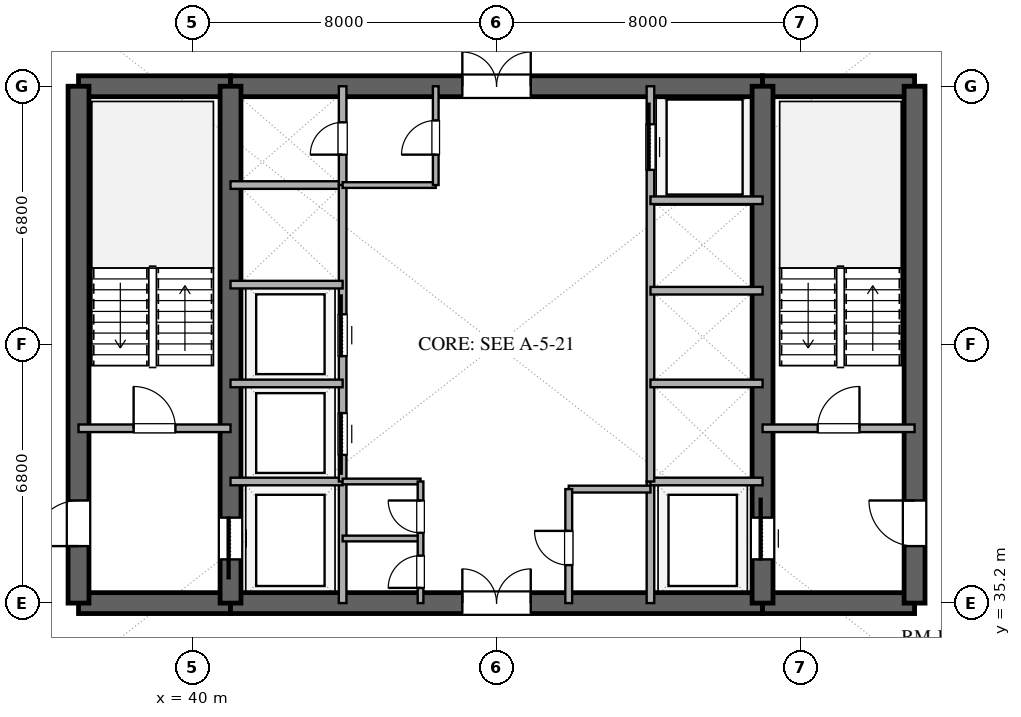
"""IFC4 building model, lengths in metres.
Left out: names, types, materials, properties, quantities, classifications, styles, units other than length and angle.
Written with IfcOpenShell. Run it as: python <this file> out.ifc"""

import sys

from ifc_helpers import new_model, si_unit, direction, frame, frame_2d, origin, place, context, subcontext, project, spatial, rectangle, extrude, element, fill, save


model = new_model("IFC4")
c1 = context("Model", 3, precision=1e-05, world=origin(), true_north=direction((0.0, 1.0)))
c2 = subcontext(c1, "Body", "Model", "MODEL_VIEW")
j1 = project(units=[si_unit("LENGTHUNIT", "METRE"), si_unit("PLANEANGLEUNIT", "RADIAN")], contexts=[c1])
p1 = place(None, origin())
s1 = spatial("IfcSite", under=j1, at=p1, CompositionType="ELEMENT")
p2 = place(p1, origin())
s2 = spatial("IfcBuilding", under=s1, at=p2, CompositionType="ELEMENT")
p3 = place(p2, frame((0.0, 0.0, 127.2)))
s3 = spatial("IfcBuildingStorey", under=s2, at=p3, CompositionType="ELEMENT", Elevation=127.2)
p4 = place(p3, frame((37.0, 35.2, 0.0), z_axis=(0.0, 0.0, 1.0), x_axis=(1.0, 0.0, 0.0)))
e1 = element("IfcWall", 1, at=p4, inside=s3, PredefinedType="SHEAR", context=c2, shape_type="SweptSolid", body=[
    extrude(rectangle(XDim=4.0, YDim=0.55, at=frame_2d((2.0, 0.0))), origin(), (0.0, 0.0, 1.0), 3.38),
])
p5 = place(p3, frame((41.0, 35.2, 0.0), z_axis=(0.0, 0.0, 1.0), x_axis=(1.0, 0.0, 0.0)))
e2 = element("IfcWall", 2, at=p5, inside=s3, PredefinedType="SHEAR", context=c2, shape_type="SweptSolid", body=[
    extrude(rectangle(XDim=14.0, YDim=0.55, at=frame_2d((7.0, 0.0))), origin(), (0.0, 0.0, 1.0), 3.38),
])
p6 = place(p5, frame((6.1, 0.0, 0.0)))
e3 = element("IfcOpeningElement", 3, at=p6, cuts=e2, PredefinedType="OPENING", context=c2, shape_type="SweptSolid", body=[
    extrude(rectangle(XDim=1.8, YDim=2.25, at=frame_2d((0.9, 1.125))), frame((0.0, 0.285, 0.0), z_axis=(0.0, -1.0, 0.0), x_axis=(1.0, 0.0, 0.0)), (0.0, 0.0, 1.0), 0.57),
])
for number, where, z_axis, x_axis in (
    (4, (55.0, 35.2, 0.0), (0.0, 0.0, 1.0), (1.0, 0.0, 0.0)),
    (5, (37.0, 48.8, 0.0), (0.0, 0.0, 1.0), (1.0, 0.0, 0.0)),
):
    element("IfcWall", number, at=place(p3, frame(where, z_axis=z_axis, x_axis=x_axis)), inside=s3, PredefinedType="SHEAR", context=c2, shape_type="SweptSolid", body=[
        extrude(rectangle(XDim=4.0, YDim=0.55, at=frame_2d((2.0, 0.0))), origin(), (0.0, 0.0, 1.0), 3.38),
    ])
p7 = place(p3, frame((41.0, 48.8, 0.0), z_axis=(0.0, 0.0, 1.0), x_axis=(1.0, 0.0, 0.0)))
e6 = element("IfcWall", 6, at=p7, inside=s3, PredefinedType="SHEAR", context=c2, shape_type="SweptSolid", body=[
    extrude(rectangle(XDim=14.0, YDim=0.55, at=frame_2d((7.0, 0.0))), origin(), (0.0, 0.0, 1.0), 3.38),
])
p8 = place(p7, frame((6.1, 0.0, 0.0)))
e7 = element("IfcOpeningElement", 7, at=p8, cuts=e6, PredefinedType="OPENING", context=c2, shape_type="SweptSolid", body=[
    extrude(rectangle(XDim=1.8, YDim=2.25, at=frame_2d((0.9, 1.125))), frame((0.0, 0.285, 0.0), z_axis=(0.0, -1.0, 0.0), x_axis=(1.0, 0.0, 0.0)), (0.0, 0.0, 1.0), 0.57),
])
p9 = place(p3, frame((55.0, 48.8, 0.0), z_axis=(0.0, 0.0, 1.0), x_axis=(1.0, 0.0, 0.0)))
e8 = element("IfcWall", 8, at=p9, inside=s3, PredefinedType="SHEAR", context=c2, shape_type="SweptSolid", body=[
    extrude(rectangle(XDim=4.0, YDim=0.55, at=frame_2d((2.0, 0.0))), origin(), (0.0, 0.0, 1.0), 3.38),
])
p10 = place(p3, frame((37.0, 35.2, 0.0), z_axis=(0.0, 0.0, 1.0), x_axis=(0.0, 1.0, 0.0)))
e9 = element("IfcWall", 9, at=p10, inside=s3, PredefinedType="SHEAR", context=c2, shape_type="SweptSolid", body=[
    extrude(rectangle(XDim=13.6, YDim=0.55, at=frame_2d((6.8, 0.0))), origin(), (0.0, 0.0, 1.0), 3.38),
])
p11 = place(p10, frame((1.5, 0.0, 0.0)))
e10 = element("IfcOpeningElement", 10, at=p11, cuts=e9, PredefinedType="OPENING", context=c2, shape_type="SweptSolid", body=[
    extrude(rectangle(XDim=1.2, YDim=2.15, at=frame_2d((0.6, 1.075))), frame((0.0, 0.285, 0.0), z_axis=(0.0, -1.0, 0.0), x_axis=(1.0, 0.0, 0.0)), (0.0, 0.0, 1.0), 0.57),
])
p12 = place(p3, frame((59.0, 35.2, 0.0), z_axis=(0.0, 0.0, 1.0), x_axis=(0.0, 1.0, 0.0)))
e11 = element("IfcWall", 11, at=p12, inside=s3, PredefinedType="SHEAR", context=c2, shape_type="SweptSolid", body=[
    extrude(rectangle(XDim=13.6, YDim=0.55, at=frame_2d((6.8, 0.0))), origin(), (0.0, 0.0, 1.0), 3.38),
])
p13 = place(p12, frame((1.5, 0.0, 0.0)))
e12 = element("IfcOpeningElement", 12, at=p13, cuts=e11, PredefinedType="OPENING", context=c2, shape_type="SweptSolid", body=[
    extrude(rectangle(XDim=1.2, YDim=2.15, at=frame_2d((0.6, 1.075))), frame((0.0, 0.285, 0.0), z_axis=(0.0, -1.0, 0.0), x_axis=(1.0, 0.0, 0.0)), (0.0, 0.0, 1.0), 0.57),
])
p14 = place(p3, frame((41.0, 35.2, 0.0), z_axis=(0.0, 0.0, 1.0), x_axis=(0.0, 1.0, 0.0)))
e13 = element("IfcWall", 13, at=p14, inside=s3, PredefinedType="SHEAR", context=c2, shape_type="SweptSolid", body=[
    extrude(rectangle(XDim=13.6, YDim=0.55, at=frame_2d((6.8, 0.0))), origin(), (0.0, 0.0, 1.0), 3.38),
])
p15 = place(p14, frame((1.15, 0.0, 0.0)))
e14 = element("IfcOpeningElement", 14, at=p15, cuts=e13, PredefinedType="OPENING", context=c2, shape_type="SweptSolid", body=[
    extrude(rectangle(XDim=1.1, YDim=2.2, at=frame_2d((0.55, 1.1))), frame((0.0, 0.285, 0.0), z_axis=(0.0, -1.0, 0.0), x_axis=(1.0, 0.0, 0.0)), (0.0, 0.0, 1.0), 0.57),
])
p16 = place(p3, frame((55.0, 35.2, 0.0), z_axis=(0.0, 0.0, 1.0), x_axis=(0.0, 1.0, 0.0)))
e15 = element("IfcWall", 15, at=p16, inside=s3, PredefinedType="SHEAR", context=c2, shape_type="SweptSolid", body=[
    extrude(rectangle(XDim=13.6, YDim=0.55, at=frame_2d((6.8, 0.0))), origin(), (0.0, 0.0, 1.0), 3.38),
])
p17 = place(p16, frame((1.15, 0.0, 0.0)))
e16 = element("IfcOpeningElement", 16, at=p17, cuts=e15, PredefinedType="OPENING", context=c2, shape_type="SweptSolid", body=[
    extrude(rectangle(XDim=1.1, YDim=2.2, at=frame_2d((0.55, 1.1))), frame((0.0, 0.285, 0.0), z_axis=(0.0, -1.0, 0.0), x_axis=(1.0, 0.0, 0.0)), (0.0, 0.0, 1.0), 0.57),
])
p18 = place(p3, frame((37.0, 39.8, 0.0), z_axis=(0.0, 0.0, 1.0), x_axis=(1.0, 0.0, 0.0)))
e17 = element("IfcWall", 17, at=p18, inside=s3, PredefinedType="SOLIDWALL", context=c2, shape_type="SweptSolid", body=[
    extrude(rectangle(XDim=4.0, YDim=0.2, at=frame_2d((2.0, 0.0))), origin(), (0.0, 0.0, 1.0), 2.74),
])
p19 = place(p18, frame((1.45, 0.0, 0.0)))
e18 = element("IfcOpeningElement", 18, at=p19, cuts=e17, PredefinedType="OPENING", context=c2, shape_type="SweptSolid", body=[
    extrude(rectangle(XDim=1.1, YDim=2.15, at=frame_2d((0.55, 1.075))), frame((0.0, 0.11, 0.0), z_axis=(0.0, -1.0, 0.0), x_axis=(1.0, 0.0, 0.0)), (0.0, 0.0, 1.0), 0.22),
])
p20 = place(p3, frame((55.0, 39.8, 0.0), z_axis=(0.0, 0.0, 1.0), x_axis=(1.0, 0.0, 0.0)))
e19 = element("IfcWall", 19, at=p20, inside=s3, PredefinedType="SOLIDWALL", context=c2, shape_type="SweptSolid", body=[
    extrude(rectangle(XDim=4.0, YDim=0.2, at=frame_2d((2.0, 0.0))), origin(), (0.0, 0.0, 1.0), 2.74),
])
p21 = place(p20, frame((1.45, 0.0, 0.0)))
e20 = element("IfcOpeningElement", 20, at=p21, cuts=e19, PredefinedType="OPENING", context=c2, shape_type="SweptSolid", body=[
    extrude(rectangle(XDim=1.1, YDim=2.15, at=frame_2d((0.55, 1.075))), frame((0.0, 0.11, 0.0), z_axis=(0.0, -1.0, 0.0), x_axis=(1.0, 0.0, 0.0)), (0.0, 0.0, 1.0), 0.22),
])
p22 = place(p3, frame((43.95, 35.2, 0.0), z_axis=(0.0, 0.0, 1.0), x_axis=(0.0, 1.0, 0.0)))
e21 = element("IfcWall", 21, at=p22, inside=s3, PredefinedType="SOLIDWALL", context=c2, shape_type="SweptSolid", body=[
    extrude(rectangle(XDim=3.2, YDim=0.2, at=frame_2d((1.6, 0.0))), origin(), (0.0, 0.0, 1.0), 2.74),
])
p23 = place(p3, frame((41.0, 38.4, 0.0), z_axis=(0.0, 0.0, 1.0), x_axis=(1.0, 0.0, 0.0)))
e22 = element("IfcWall", 22, at=p23, inside=s3, PredefinedType="SOLIDWALL", context=c2, shape_type="SweptSolid", body=[
    extrude(rectangle(XDim=2.95, YDim=0.2, at=frame_2d((1.475, 0.0))), origin(), (0.0, 0.0, 1.0), 2.74),
])
p24 = place(p3, frame((52.05, 35.2, 0.0), z_axis=(0.0, 0.0, 1.0), x_axis=(0.0, 1.0, 0.0)))
e23 = element("IfcWall", 23, at=p24, inside=s3, PredefinedType="SOLIDWALL", context=c2, shape_type="SweptSolid", body=[
    extrude(rectangle(XDim=3.2, YDim=0.2, at=frame_2d((1.6, 0.0))), origin(), (0.0, 0.0, 1.0), 2.74),
])
for number, where, z_axis, x_axis in (
    (24, (52.05, 38.4, 0.0), (0.0, 0.0, 1.0), (1.0, 0.0, 0.0)),
    (25, (41.0, 46.2, 0.0), (0.0, 0.0, 1.0), (1.0, 0.0, 0.0)),
):
    element("IfcWall", number, at=place(p3, frame(where, z_axis=z_axis, x_axis=x_axis)), inside=s3, PredefinedType="SOLIDWALL", context=c2, shape_type="SweptSolid", body=[
        extrude(rectangle(XDim=2.95, YDim=0.2, at=frame_2d((1.475, 0.0))), origin(), (0.0, 0.0, 1.0), 2.74),
    ])
p25 = place(p3, frame((43.95, 46.2, 0.0), z_axis=(0.0, 0.0, 1.0), x_axis=(0.0, 1.0, 0.0)))
e26 = element("IfcWall", 26, at=p25, inside=s3, PredefinedType="SOLIDWALL", context=c2, shape_type="SweptSolid", body=[
    extrude(rectangle(XDim=2.6, YDim=0.2, at=frame_2d((1.3, 0.0))), origin(), (0.0, 0.0, 1.0), 2.74),
])
p26 = place(p25, frame((0.8, 0.0, 0.0)))
e27 = element("IfcOpeningElement", 27, at=p26, cuts=e26, PredefinedType="OPENING", context=c2, shape_type="SweptSolid", body=[
    extrude(rectangle(XDim=0.85, YDim=2.15, at=frame_2d((0.425, 1.075))), frame((0.0, 0.11, 0.0), z_axis=(0.0, -1.0, 0.0), x_axis=(1.0, 0.0, 0.0)), (0.0, 0.0, 1.0), 0.22),
])
p27 = place(p3, frame((43.95, 38.4, 0.0), z_axis=(0.0, 0.0, 1.0), x_axis=(0.0, 1.0, 0.0)))
e28 = element("IfcWall", 28, at=p27, inside=s3, PredefinedType="SOLIDWALL", context=c2, shape_type="SweptSolid", body=[
    extrude(rectangle(XDim=7.8, YDim=0.2, at=frame_2d((3.9, 0.0))), origin(), (0.0, 0.0, 1.0), 2.74),
])
p28 = place(p27, frame((0.7, 0.0, 0.0)))
e29 = element("IfcOpeningElement", 29, at=p28, cuts=e28, PredefinedType="OPENING", context=c2, shape_type="SweptSolid", body=[
    extrude(rectangle(XDim=1.1, YDim=2.2, at=frame_2d((0.55, 1.1))), frame((0.0, 0.11, 0.0), z_axis=(0.0, -1.0, 0.0), x_axis=(1.0, 0.0, 0.0)), (0.0, 0.0, 1.0), 0.22),
])
p29 = place(p27, frame((3.3, 0.0, 0.0)))
e30 = element("IfcOpeningElement", 30, at=p29, cuts=e28, PredefinedType="OPENING", context=c2, shape_type="SweptSolid", body=[
    extrude(rectangle(XDim=1.1, YDim=2.2, at=frame_2d((0.55, 1.1))), frame((0.0, 0.11, 0.0), z_axis=(0.0, -1.0, 0.0), x_axis=(1.0, 0.0, 0.0)), (0.0, 0.0, 1.0), 0.22),
])
for number, where, z_axis, x_axis in (
    (31, (41.0, 40.98, 0.0), (0.0, 0.0, 1.0), (1.0, 0.0, 0.0)),
    (32, (41.0, 43.58, 0.0), (0.0, 0.0, 1.0), (1.0, 0.0, 0.0)),
):
    element("IfcWall", number, at=place(p3, frame(where, z_axis=z_axis, x_axis=x_axis)), inside=s3, PredefinedType="SOLIDWALL", context=c2, shape_type="SweptSolid", body=[
        extrude(rectangle(XDim=2.95, YDim=0.2, at=frame_2d((1.475, 0.0))), origin(), (0.0, 0.0, 1.0), 2.74),
    ])
p30 = place(p3, frame((52.05, 38.4, 0.0), z_axis=(0.0, 0.0, 1.0), x_axis=(0.0, 1.0, 0.0)))
e33 = element("IfcWall", 33, at=p30, inside=s3, PredefinedType="SOLIDWALL", context=c2, shape_type="SweptSolid", body=[
    extrude(rectangle(XDim=10.4, YDim=0.2, at=frame_2d((5.2, 0.0))), origin(), (0.0, 0.0, 1.0), 2.74),
])
p31 = place(p30, frame((8.2, 0.0, 0.0)))
e34 = element("IfcOpeningElement", 34, at=p31, cuts=e33, PredefinedType="OPENING", context=c2, shape_type="SweptSolid", body=[
    extrude(rectangle(XDim=1.2, YDim=2.2, at=frame_2d((0.6, 1.1))), frame((0.0, 0.11, 0.0), z_axis=(0.0, -1.0, 0.0), x_axis=(1.0, 0.0, 0.0)), (0.0, 0.0, 1.0), 0.22),
])
for number, where, z_axis, x_axis in (
    (35, (52.05, 40.98, 0.0), (0.0, 0.0, 1.0), (1.0, 0.0, 0.0)),
    (36, (52.05, 43.42, 0.0), (0.0, 0.0, 1.0), (1.0, 0.0, 0.0)),
    (37, (52.05, 45.8, 0.0), (0.0, 0.0, 1.0), (1.0, 0.0, 0.0)),
):
    element("IfcWall", number, at=place(p3, frame(where, z_axis=z_axis, x_axis=x_axis)), inside=s3, PredefinedType="SOLIDWALL", context=c2, shape_type="SweptSolid", body=[
        extrude(rectangle(XDim=2.95, YDim=0.2, at=frame_2d((1.475, 0.0))), origin(), (0.0, 0.0, 1.0), 2.74),
    ])
for number, where, z_axis, x_axis in (
    (38, (43.95, 36.9, 0.0), (0.0, 0.0, 1.0), (1.0, 0.0, 0.0)),
    (39, (43.95, 38.4, 0.0), (0.0, 0.0, 1.0), (1.0, 0.0, 0.0)),
):
    element("IfcWall", number, at=place(p3, frame(where, z_axis=z_axis, x_axis=x_axis)), inside=s3, PredefinedType="PARTITIONING", context=c2, shape_type="SweptSolid", body=[
        extrude(rectangle(XDim=2.05, YDim=0.15, at=frame_2d((1.025, 0.0))), origin(), (0.0, 0.0, 1.0), 2.74),
    ])
p32 = place(p3, frame((46.0, 35.2, 0.0), z_axis=(0.0, 0.0, 1.0), x_axis=(0.0, 1.0, 0.0)))
e40 = element("IfcWall", 40, at=p32, inside=s3, PredefinedType="PARTITIONING", context=c2, shape_type="SweptSolid", body=[
    extrude(rectangle(XDim=3.2, YDim=0.15, at=frame_2d((1.6, 0.0))), origin(), (0.0, 0.0, 1.0), 2.74),
])
p33 = place(p32, frame((0.4, 0.0, 0.0)))
e41 = element("IfcOpeningElement", 41, at=p33, cuts=e40, PredefinedType="OPENING", context=c2, shape_type="SweptSolid", body=[
    extrude(rectangle(XDim=0.85, YDim=2.15, at=frame_2d((0.425, 1.075))), frame((0.0, 0.085, 0.0), z_axis=(0.0, -1.0, 0.0), x_axis=(1.0, 0.0, 0.0)), (0.0, 0.0, 1.0), 0.17),
])
p34 = place(p32, frame((1.85, 0.0, 0.0)))
e42 = element("IfcOpeningElement", 42, at=p34, cuts=e40, PredefinedType="OPENING", context=c2, shape_type="SweptSolid", body=[
    extrude(rectangle(XDim=0.85, YDim=2.15, at=frame_2d((0.425, 1.075))), frame((0.0, 0.085, 0.0), z_axis=(0.0, -1.0, 0.0), x_axis=(1.0, 0.0, 0.0)), (0.0, 0.0, 1.0), 0.17),
])
p35 = place(p3, frame((43.95, 46.2, 0.0), z_axis=(0.0, 0.0, 1.0), x_axis=(1.0, 0.0, 0.0)))
e43 = element("IfcWall", 43, at=p35, inside=s3, PredefinedType="PARTITIONING", context=c2, shape_type="SweptSolid", body=[
    extrude(rectangle(XDim=2.45, YDim=0.15, at=frame_2d((1.225, 0.0))), origin(), (0.0, 0.0, 1.0), 2.74),
])
p36 = place(p3, frame((46.4, 46.2, 0.0), z_axis=(0.0, 0.0, 1.0), x_axis=(0.0, 1.0, 0.0)))
e44 = element("IfcWall", 44, at=p36, inside=s3, PredefinedType="PARTITIONING", context=c2, shape_type="SweptSolid", body=[
    extrude(rectangle(XDim=2.6, YDim=0.15, at=frame_2d((1.3, 0.0))), origin(), (0.0, 0.0, 1.0), 2.74),
])
p37 = place(p36, frame((0.8, 0.0, 0.0)))
e45 = element("IfcOpeningElement", 45, at=p37, cuts=e44, PredefinedType="OPENING", context=c2, shape_type="SweptSolid", body=[
    extrude(rectangle(XDim=0.9, YDim=2.15, at=frame_2d((0.45, 1.075))), frame((0.0, 0.085, 0.0), z_axis=(0.0, -1.0, 0.0), x_axis=(1.0, 0.0, 0.0)), (0.0, 0.0, 1.0), 0.17),
])
p38 = place(p3, frame((49.9, 38.2, 0.0), z_axis=(0.0, 0.0, 1.0), x_axis=(1.0, 0.0, 0.0)))
e46 = element("IfcWall", 46, at=p38, inside=s3, PredefinedType="PLUMBINGWALL", context=c2, shape_type="SweptSolid", body=[
    extrude(rectangle(XDim=2.15, YDim=0.18, at=frame_2d((1.075, 0.0))), origin(), (0.0, 0.0, 1.0), 2.74),
])
p39 = place(p3, frame((49.9, 35.2, 0.0), z_axis=(0.0, 0.0, 1.0), x_axis=(0.0, 1.0, 0.0)))
e47 = element("IfcWall", 47, at=p39, inside=s3, PredefinedType="PLUMBINGWALL", context=c2, shape_type="SweptSolid", body=[
    extrude(rectangle(XDim=3.0, YDim=0.18, at=frame_2d((1.5, 0.0))), origin(), (0.0, 0.0, 1.0), 2.74),
])
p40 = place(p39, frame((1.0, 0.0, 0.0)))
e48 = element("IfcOpeningElement", 48, at=p40, cuts=e47, PredefinedType="OPENING", context=c2, shape_type="SweptSolid", body=[
    extrude(rectangle(XDim=0.9, YDim=2.1, at=frame_2d((0.45, 1.05))), frame((0.0, 0.1, 0.0), z_axis=(0.0, -1.0, 0.0), x_axis=(1.0, 0.0, 0.0)), (0.0, 0.0, 1.0), 0.2),
])
p41 = place(p15, origin())
e49 = element("IfcDoor", 49, at=p41, inside=s3, OperationType="SLIDING_TO_LEFT", PredefinedType="DOOR", context=c2, shape_type="SweptSolid", body=[
    extrude(rectangle(XDim=1.1, YDim=2.2, at=frame_2d((0.55, 1.1))), frame((0.0, 0.025, 0.0), z_axis=(0.0, -1.0, 0.0), x_axis=(1.0, 0.0, 0.0)), (0.0, 0.0, 1.0), 0.05),
])
fill(e14, e49)
p42 = place(p17, origin())
e50 = element("IfcDoor", 50, at=p42, inside=s3, OperationType="SLIDING_TO_RIGHT", PredefinedType="DOOR", context=c2, shape_type="SweptSolid", body=[
    extrude(rectangle(XDim=1.1, YDim=2.2, at=frame_2d((0.55, 1.1))), frame((0.0, 0.025, 0.0), z_axis=(0.0, -1.0, 0.0), x_axis=(1.0, 0.0, 0.0)), (0.0, 0.0, 1.0), 0.05),
])
fill(e16, e50)
p43 = place(p11, origin())
e51 = element("IfcDoor", 51, at=p43, inside=s3, OperationType="SINGLE_SWING_LEFT", PredefinedType="DOOR", context=c2, shape_type="SweptSolid", body=[
    extrude(rectangle(XDim=1.2, YDim=2.15, at=frame_2d((0.6, 1.075))), frame((0.0, 0.025, 0.0), z_axis=(0.0, -1.0, 0.0), x_axis=(1.0, 0.0, 0.0)), (0.0, 0.0, 1.0), 0.05),
])
fill(e10, e51)
p44 = place(p13, origin())
e52 = element("IfcDoor", 52, at=p44, inside=s3, OperationType="SINGLE_SWING_RIGHT", PredefinedType="DOOR", context=c2, shape_type="SweptSolid", body=[
    extrude(rectangle(XDim=1.2, YDim=2.15, at=frame_2d((0.6, 1.075))), frame((0.0, 0.025, 0.0), z_axis=(0.0, -1.0, 0.0), x_axis=(1.0, 0.0, 0.0)), (0.0, 0.0, 1.0), 0.05),
])
fill(e12, e52)
p45 = place(p6, origin())
e53 = element("IfcDoor", 53, at=p45, inside=s3, OperationType="DOUBLE_DOOR_SINGLE_SWING", PredefinedType="DOOR", context=c2, shape_type="SweptSolid", body=[
    extrude(rectangle(XDim=1.8, YDim=2.25, at=frame_2d((0.9, 1.125))), frame((0.0, 0.025, 0.0), z_axis=(0.0, -1.0, 0.0), x_axis=(1.0, 0.0, 0.0)), (0.0, 0.0, 1.0), 0.05),
])
fill(e3, e53)
p46 = place(p8, origin())
e54 = element("IfcDoor", 54, at=p46, inside=s3, OperationType="DOUBLE_DOOR_SINGLE_SWING", PredefinedType="DOOR", context=c2, shape_type="SweptSolid", body=[
    extrude(rectangle(XDim=1.8, YDim=2.25, at=frame_2d((0.9, 1.125))), frame((0.0, 0.025, 0.0), z_axis=(0.0, -1.0, 0.0), x_axis=(1.0, 0.0, 0.0)), (0.0, 0.0, 1.0), 0.05),
])
fill(e7, e54)
p47 = place(p19, origin())
e55 = element("IfcDoor", 55, at=p47, inside=s3, OperationType="SINGLE_SWING_LEFT", PredefinedType="DOOR", context=c2, shape_type="SweptSolid", body=[
    extrude(rectangle(XDim=1.1, YDim=2.15, at=frame_2d((0.55, 1.075))), frame((0.0, 0.025, 0.0), z_axis=(0.0, -1.0, 0.0), x_axis=(1.0, 0.0, 0.0)), (0.0, 0.0, 1.0), 0.05),
])
fill(e18, e55)
p48 = place(p21, origin())
e56 = element("IfcDoor", 56, at=p48, inside=s3, OperationType="SINGLE_SWING_RIGHT", PredefinedType="DOOR", context=c2, shape_type="SweptSolid", body=[
    extrude(rectangle(XDim=1.1, YDim=2.15, at=frame_2d((0.55, 1.075))), frame((0.0, 0.025, 0.0), z_axis=(0.0, -1.0, 0.0), x_axis=(1.0, 0.0, 0.0)), (0.0, 0.0, 1.0), 0.05),
])
fill(e20, e56)
p49 = place(p26, origin())
e57 = element("IfcDoor", 57, at=p49, inside=s3, OperationType="SINGLE_SWING_LEFT", PredefinedType="DOOR", context=c2, shape_type="SweptSolid", body=[
    extrude(rectangle(XDim=0.85, YDim=2.15, at=frame_2d((0.425, 1.075))), frame((0.0, 0.025, 0.0), z_axis=(0.0, -1.0, 0.0), x_axis=(1.0, 0.0, 0.0)), (0.0, 0.0, 1.0), 0.05),
])
fill(e27, e57)
p50 = place(p28, origin())
e58 = element("IfcDoor", 58, at=p50, inside=s3, OperationType="SLIDING_TO_LEFT", PredefinedType="DOOR", context=c2, shape_type="SweptSolid", body=[
    extrude(rectangle(XDim=1.1, YDim=2.2, at=frame_2d((0.55, 1.1))), frame((0.0, 0.025, 0.0), z_axis=(0.0, -1.0, 0.0), x_axis=(1.0, 0.0, 0.0)), (0.0, 0.0, 1.0), 0.05),
])
fill(e29, e58)
p51 = place(p29, origin())
e59 = element("IfcDoor", 59, at=p51, inside=s3, OperationType="SLIDING_TO_RIGHT", PredefinedType="DOOR", context=c2, shape_type="SweptSolid", body=[
    extrude(rectangle(XDim=1.1, YDim=2.2, at=frame_2d((0.55, 1.1))), frame((0.0, 0.025, 0.0), z_axis=(0.0, -1.0, 0.0), x_axis=(1.0, 0.0, 0.0)), (0.0, 0.0, 1.0), 0.05),
])
fill(e30, e59)
p52 = place(p31, origin())
e60 = element("IfcDoor", 60, at=p52, inside=s3, OperationType="SLIDING_TO_RIGHT", PredefinedType="DOOR", context=c2, shape_type="SweptSolid", body=[
    extrude(rectangle(XDim=1.2, YDim=2.2, at=frame_2d((0.6, 1.1))), frame((0.0, 0.025, 0.0), z_axis=(0.0, -1.0, 0.0), x_axis=(1.0, 0.0, 0.0)), (0.0, 0.0, 1.0), 0.05),
])
fill(e34, e60)
p53 = place(p33, origin())
e61 = element("IfcDoor", 61, at=p53, inside=s3, OperationType="SINGLE_SWING_LEFT", PredefinedType="DOOR", context=c2, shape_type="SweptSolid", body=[
    extrude(rectangle(XDim=0.85, YDim=2.15, at=frame_2d((0.425, 1.075))), frame((0.0, 0.025, 0.0), z_axis=(0.0, -1.0, 0.0), x_axis=(1.0, 0.0, 0.0)), (0.0, 0.0, 1.0), 0.05),
])
fill(e41, e61)
p54 = place(p34, origin())
e62 = element("IfcDoor", 62, at=p54, inside=s3, OperationType="SINGLE_SWING_RIGHT", PredefinedType="DOOR", context=c2, shape_type="SweptSolid", body=[
    extrude(rectangle(XDim=0.85, YDim=2.15, at=frame_2d((0.425, 1.075))), frame((0.0, 0.025, 0.0), z_axis=(0.0, -1.0, 0.0), x_axis=(1.0, 0.0, 0.0)), (0.0, 0.0, 1.0), 0.05),
])
fill(e42, e62)
p55 = place(p37, origin())
e63 = element("IfcDoor", 63, at=p55, inside=s3, OperationType="SINGLE_SWING_LEFT", PredefinedType="DOOR", context=c2, shape_type="SweptSolid", body=[
    extrude(rectangle(XDim=0.9, YDim=2.15, at=frame_2d((0.45, 1.075))), frame((0.0, 0.025, 0.0), z_axis=(0.0, -1.0, 0.0), x_axis=(1.0, 0.0, 0.0)), (0.0, 0.0, 1.0), 0.05),
])
fill(e45, e63)
p56 = place(p40, origin())
e64 = element("IfcDoor", 64, at=p56, inside=s3, OperationType="SINGLE_SWING_RIGHT", PredefinedType="DOOR", context=c2, shape_type="SweptSolid", body=[
    extrude(rectangle(XDim=0.9, YDim=2.1, at=frame_2d((0.45, 1.05))), frame((0.0, 0.025, 0.0), z_axis=(0.0, -1.0, 0.0), x_axis=(1.0, 0.0, 0.0)), (0.0, 0.0, 1.0), 0.05),
])
fill(e48, e64)
save(model, sys.argv[1])
